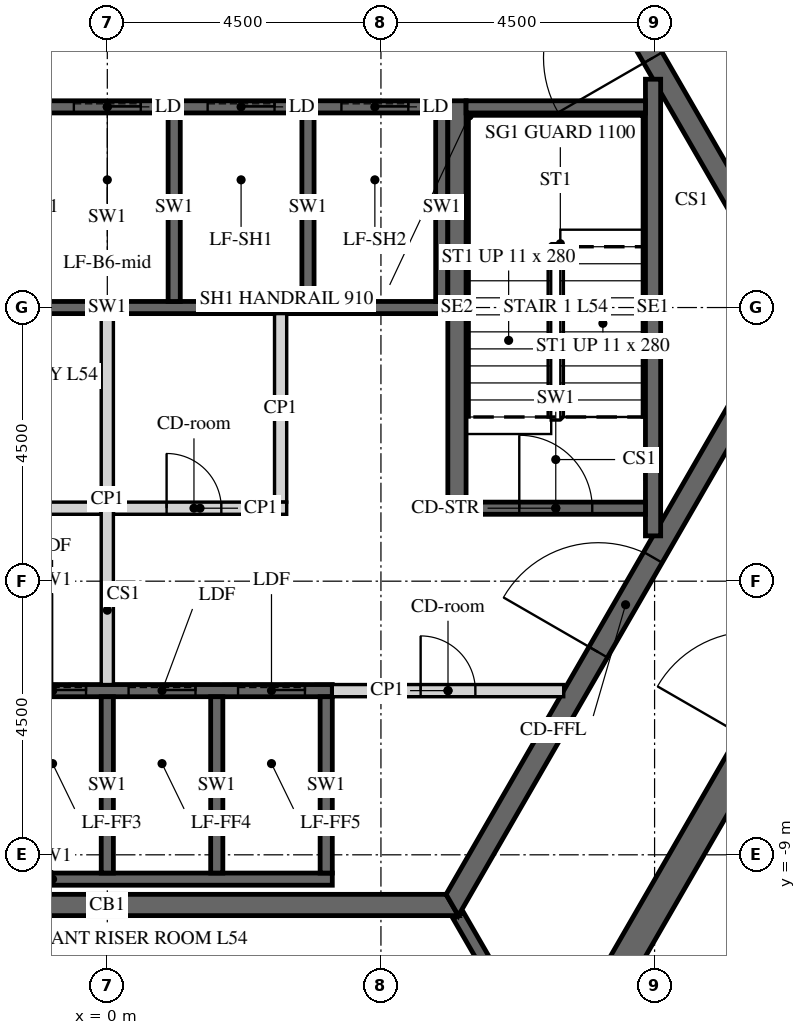
"""IFC4 building model, lengths in metres.
Left out: names, types, materials, properties, quantities, classifications, styles, units other than length and angle.
Written with IfcOpenShell. Run it as: python <this file> out.ifc"""

import sys

from ifc_helpers import new_model, si_unit, direction, frame, frame_2d, origin, place, context, subcontext, project, spatial, polyline, rectangle, outline, extrude, element, fill, save


model = new_model("IFC4")
c1 = context("Model", 3, precision=1e-05, world=origin(), true_north=direction((0.0, 1.0)))
c2 = subcontext(c1, "Body", "Model", "MODEL_VIEW")
j1 = project(units=[si_unit("LENGTHUNIT", "METRE"), si_unit("PLANEANGLEUNIT", "RADIAN")], contexts=[c1])
p1 = place(None, origin())
s1 = spatial("IfcSite", under=j1, at=p1, CompositionType="ELEMENT")
p2 = place(p1, origin())
s2 = spatial("IfcBuilding", under=s1, at=p2, CompositionType="ELEMENT")
p3 = place(p2, frame((0.0, 0.0, 226.8)))
s3 = spatial("IfcBuildingStorey", under=s2, at=p3, CompositionType="ELEMENT", Elevation=226.8)
p4 = place(p3, frame((7.361, -12.75, -0.15), z_axis=(0.0, 0.0, 1.0), x_axis=(0.50000571537, 0.866022103989, 0.0)))
e1 = element("IfcWall", 1, at=p4, inside=s3, PredefinedType="SHEAR", context=c2, shape_type="SweptSolid", body=[
    extrude(outline(polyline([(-0.144, -0.25), (14.867, -0.25), (14.578, 0.25), (0.144, 0.25), (-0.144, -0.25)])), origin(), (0.0, 0.0, 1.0), 3.9),
])
p5 = place(p4, frame((6.49, 0.0, 0.15)))
e2 = element("IfcOpeningElement", 2, at=p5, cuts=e1, PredefinedType="OPENING", context=c2, shape_type="SweptSolid", body=[
    extrude(rectangle(XDim=1.8, YDim=2.4, at=frame_2d((0.9, 1.2))), frame((0.0, 0.26, 0.0), z_axis=(0.0, -1.0, 0.0), x_axis=(1.0, 0.0, 0.0)), (0.0, 0.0, 1.0), 0.52),
])
p6 = place(p3, frame((14.722, 0.0, -0.15), z_axis=(0.0, 0.0, 1.0), x_axis=(-0.50000571537, 0.866022103989, 0.0)))
e3 = element("IfcWall", 3, at=p6, inside=s3, PredefinedType="SHEAR", context=c2, shape_type="SweptSolid", body=[
    extrude(outline(polyline([(-0.144, -0.25), (14.867, -0.25), (14.578, 0.25), (0.144, 0.25), (-0.144, -0.25)])), origin(), (0.0, 0.0, 1.0), 3.9),
])
p7 = place(p6, frame((6.432, 0.0, 0.15)))
e4 = element("IfcOpeningElement", 4, at=p7, cuts=e3, PredefinedType="OPENING", context=c2, shape_type="SweptSolid", body=[
    extrude(rectangle(XDim=1.8, YDim=2.4, at=frame_2d((0.9, 1.2))), frame((0.0, 0.26, 0.0), z_axis=(0.0, -1.0, 0.0), x_axis=(1.0, 0.0, 0.0)), (0.0, 0.0, 1.0), 0.52),
])
p8 = place(p3, frame((-5.673, -9.825, -0.15), z_axis=(0.0, 0.0, 1.0), x_axis=(1.0, 0.0, 0.0)))
e5 = element("IfcWall", 5, at=p8, inside=s3, PredefinedType="SHEAR", context=c2, shape_type="SweptSolid", body=[
    extrude(outline(polyline([(-0.101, -0.175), (11.446, -0.175), (11.244, 0.175), (0.101, 0.175), (-0.101, -0.175)])), origin(), (0.0, 0.0, 1.0), 3.9),
])
p9 = place(p3, frame((5.673, -9.825, -0.15), z_axis=(0.0, 0.0, 1.0), x_axis=(0.499995046907, 0.866028263435, 0.0)))
e6 = element("IfcWall", 6, at=p9, inside=s3, PredefinedType="SHEAR", context=c2, shape_type="SweptSolid", body=[
    extrude(outline(polyline([(-0.101, -0.175), (11.446, -0.175), (11.244, 0.175), (0.101, 0.175), (-0.101, -0.175)])), origin(), (0.0, 0.0, 1.0), 3.9),
])
p10 = place(p9, frame((4.801, 0.0, 0.15)))
e7 = element("IfcOpeningElement", 7, at=p10, cuts=e6, PredefinedType="OPENING", context=c2, shape_type="SweptSolid", body=[
    extrude(rectangle(XDim=1.8, YDim=2.4, at=frame_2d((0.9, 1.2))), frame((0.0, 0.185, 0.0), z_axis=(0.0, -1.0, 0.0), x_axis=(1.0, 0.0, 0.0)), (0.0, 0.0, 1.0), 0.37),
])
p11 = place(p3, frame((11.345, 0.0, -0.15), z_axis=(0.0, 0.0, 1.0), x_axis=(-0.499995046907, 0.866028263435, 0.0)))
e8 = element("IfcWall", 8, at=p11, inside=s3, PredefinedType="SHEAR", context=c2, shape_type="SweptSolid", body=[
    extrude(outline(polyline([(-0.101, -0.175), (11.446, -0.175), (11.244, 0.175), (0.101, 0.175), (-0.101, -0.175)])), origin(), (0.0, 0.0, 1.0), 3.9),
])
p12 = place(p11, frame((4.744, 0.0, 0.15)))
e9 = element("IfcOpeningElement", 9, at=p12, cuts=e8, PredefinedType="OPENING", context=c2, shape_type="SweptSolid", body=[
    extrude(rectangle(XDim=1.8, YDim=2.4, at=frame_2d((0.9, 1.2))), frame((0.0, 0.185, 0.0), z_axis=(0.0, -1.0, 0.0), x_axis=(1.0, 0.0, 0.0)), (0.0, 0.0, 1.0), 0.37),
])
p13 = place(p3, frame((-5.6, 3.3, -0.25), z_axis=(0.0, 0.0, 1.0), x_axis=(1.0, 0.0, 0.0)))
e10 = element("IfcWall", 10, at=p13, inside=s3, PredefinedType="SHEAR", context=c2, shape_type="SweptSolid", body=[
    extrude(rectangle(XDim=11.2, YDim=0.2, at=frame_2d((5.6, 0.0))), origin(), (0.0, 0.0, 1.0), 3.9),
])
p14 = place(p13, frame((0.65, 0.0, 0.25)))
e11 = element("IfcOpeningElement", 11, at=p14, cuts=e10, PredefinedType="OPENING", context=c2, shape_type="SweptSolid", body=[
    extrude(rectangle(XDim=1.1, YDim=2.1, at=frame_2d((0.55, 1.05))), frame((0.0, 0.11, 0.0), z_axis=(0.0, -1.0, 0.0), x_axis=(1.0, 0.0, 0.0)), (0.0, 0.0, 1.0), 0.22),
])
p15 = place(p13, frame((2.85, 0.0, 0.25)))
e12 = element("IfcOpeningElement", 12, at=p15, cuts=e10, PredefinedType="OPENING", context=c2, shape_type="SweptSolid", body=[
    extrude(rectangle(XDim=1.1, YDim=2.1, at=frame_2d((0.55, 1.05))), frame((0.0, 0.11, 0.0), z_axis=(0.0, -1.0, 0.0), x_axis=(1.0, 0.0, 0.0)), (0.0, 0.0, 1.0), 0.22),
])
p16 = place(p13, frame((5.05, 0.0, 0.25)))
e13 = element("IfcOpeningElement", 13, at=p16, cuts=e10, PredefinedType="OPENING", context=c2, shape_type="SweptSolid", body=[
    extrude(rectangle(XDim=1.1, YDim=2.1, at=frame_2d((0.55, 1.05))), frame((0.0, 0.11, 0.0), z_axis=(0.0, -1.0, 0.0), x_axis=(1.0, 0.0, 0.0)), (0.0, 0.0, 1.0), 0.22),
])
p17 = place(p13, frame((7.25, 0.0, 0.25)))
e14 = element("IfcOpeningElement", 14, at=p17, cuts=e10, PredefinedType="OPENING", context=c2, shape_type="SweptSolid", body=[
    extrude(rectangle(XDim=1.1, YDim=2.1, at=frame_2d((0.55, 1.05))), frame((0.0, 0.11, 0.0), z_axis=(0.0, -1.0, 0.0), x_axis=(1.0, 0.0, 0.0)), (0.0, 0.0, 1.0), 0.22),
])
p18 = place(p13, frame((9.45, 0.0, 0.25)))
e15 = element("IfcOpeningElement", 15, at=p18, cuts=e10, PredefinedType="OPENING", context=c2, shape_type="SweptSolid", body=[
    extrude(rectangle(XDim=1.1, YDim=2.1, at=frame_2d((0.55, 1.05))), frame((0.0, 0.11, 0.0), z_axis=(0.0, -1.0, 0.0), x_axis=(1.0, 0.0, 0.0)), (0.0, 0.0, 1.0), 0.22),
])
p19 = place(p3, frame((-5.6, 0.0, -0.25), z_axis=(0.0, 0.0, 1.0), x_axis=(1.0, 0.0, 0.0)))
e16 = element("IfcWall", 16, at=p19, inside=s3, PredefinedType="SHEAR", context=c2, shape_type="SweptSolid", body=[
    extrude(rectangle(XDim=11.2, YDim=0.2, at=frame_2d((5.6, 0.0))), origin(), (0.0, 0.0, 1.0), 3.9),
])
for number, where, z_axis, x_axis in (
    (17, (1.1, 0.1, -0.25), (0.0, 0.0, 1.0), (0.0, 1.0, 0.0)),
    (18, (3.3, 0.1, -0.25), (0.0, 0.0, 1.0), (0.0, 1.0, 0.0)),
    (19, (5.5, 0.1, -0.25), (0.0, 0.0, 1.0), (0.0, 1.0, 0.0)),
):
    element("IfcWall", number, at=place(p3, frame(where, z_axis=z_axis, x_axis=x_axis)), inside=s3, PredefinedType="SHEAR", context=c2, shape_type="SweptSolid", body=[
        extrude(rectangle(XDim=3.1, YDim=0.2, at=frame_2d((1.55, 0.0))), origin(), (0.0, 0.0, 1.0), 3.9),
    ])
p20 = place(p3, frame((-5.5, -6.3, -0.25), z_axis=(0.0, 0.0, 1.0), x_axis=(1.0, 0.0, 0.0)))
e20 = element("IfcWall", 20, at=p20, inside=s3, PredefinedType="SHEAR", context=c2, shape_type="SweptSolid", body=[
    extrude(rectangle(XDim=9.2, YDim=0.2, at=frame_2d((4.6, 0.0))), origin(), (0.0, 0.0, 1.0), 3.9),
])
p21 = place(p20, frame((0.45, 0.0, 0.25)))
e21 = element("IfcOpeningElement", 21, at=p21, cuts=e20, PredefinedType="OPENING", context=c2, shape_type="SweptSolid", body=[
    extrude(rectangle(XDim=1.1, YDim=2.1, at=frame_2d((0.55, 1.05))), frame((0.0, 0.11, 0.0), z_axis=(0.0, -1.0, 0.0), x_axis=(1.0, 0.0, 0.0)), (0.0, 0.0, 1.0), 0.22),
])
p22 = place(p20, frame((2.25, 0.0, 0.25)))
e22 = element("IfcOpeningElement", 22, at=p22, cuts=e20, PredefinedType="OPENING", context=c2, shape_type="SweptSolid", body=[
    extrude(rectangle(XDim=1.1, YDim=2.1, at=frame_2d((0.55, 1.05))), frame((0.0, 0.11, 0.0), z_axis=(0.0, -1.0, 0.0), x_axis=(1.0, 0.0, 0.0)), (0.0, 0.0, 1.0), 0.22),
])
p23 = place(p20, frame((4.05, 0.0, 0.25)))
e23 = element("IfcOpeningElement", 23, at=p23, cuts=e20, PredefinedType="OPENING", context=c2, shape_type="SweptSolid", body=[
    extrude(rectangle(XDim=1.1, YDim=2.1, at=frame_2d((0.55, 1.05))), frame((0.0, 0.11, 0.0), z_axis=(0.0, -1.0, 0.0), x_axis=(1.0, 0.0, 0.0)), (0.0, 0.0, 1.0), 0.22),
])
p24 = place(p20, frame((5.85, 0.0, 0.25)))
e24 = element("IfcOpeningElement", 24, at=p24, cuts=e20, PredefinedType="OPENING", context=c2, shape_type="SweptSolid", body=[
    extrude(rectangle(XDim=1.1, YDim=2.1, at=frame_2d((0.55, 1.05))), frame((0.0, 0.11, 0.0), z_axis=(0.0, -1.0, 0.0), x_axis=(1.0, 0.0, 0.0)), (0.0, 0.0, 1.0), 0.22),
])
p25 = place(p20, frame((7.65, 0.0, 0.25)))
e25 = element("IfcOpeningElement", 25, at=p25, cuts=e20, PredefinedType="OPENING", context=c2, shape_type="SweptSolid", body=[
    extrude(rectangle(XDim=1.1, YDim=2.1, at=frame_2d((0.55, 1.05))), frame((0.0, 0.11, 0.0), z_axis=(0.0, -1.0, 0.0), x_axis=(1.0, 0.0, 0.0)), (0.0, 0.0, 1.0), 0.22),
])
p26 = place(p3, frame((-5.5, -9.4, -0.25), z_axis=(0.0, 0.0, 1.0), x_axis=(1.0, 0.0, 0.0)))
e26 = element("IfcWall", 26, at=p26, inside=s3, PredefinedType="SHEAR", context=c2, shape_type="SweptSolid", body=[
    extrude(rectangle(XDim=9.2, YDim=0.2, at=frame_2d((4.6, 0.0))), origin(), (0.0, 0.0, 1.0), 3.9),
])
for number, where, z_axis, x_axis in (
    (27, (0.0, -9.3, -0.25), (0.0, 0.0, 1.0), (0.0, 1.0, 0.0)),
    (28, (1.8, -9.3, -0.25), (0.0, 0.0, 1.0), (0.0, 1.0, 0.0)),
    (29, (3.6, -9.3, -0.25), (0.0, 0.0, 1.0), (0.0, 1.0, 0.0)),
):
    element("IfcWall", number, at=place(p3, frame(where, z_axis=z_axis, x_axis=x_axis)), inside=s3, PredefinedType="SHEAR", context=c2, shape_type="SweptSolid", body=[
        extrude(rectangle(XDim=2.9, YDim=0.2, at=frame_2d((1.45, 0.0))), origin(), (0.0, 0.0, 1.0), 3.9),
    ])
p27 = place(p3, frame((-5.6, -3.3, 0.0), z_axis=(0.0, 0.0, 1.0), x_axis=(1.0, 0.0, 0.0)))
e30 = element("IfcWall", 30, at=p27, inside=s3, PredefinedType="PARTITIONING", context=c2, shape_type="SweptSolid", body=[
    extrude(rectangle(XDim=5.5, YDim=0.2, at=frame_2d((2.75, 0.0))), origin(), (0.0, 0.0, 1.0), 3.65),
])
p28 = place(p27, frame((2.3, 0.0, 0.0)))
e31 = element("IfcOpeningElement", 31, at=p28, cuts=e30, PredefinedType="OPENING", context=c2, shape_type="SweptSolid", body=[
    extrude(rectangle(XDim=0.9, YDim=2.1, at=frame_2d((0.45, 1.05))), frame((0.0, 0.11, 0.0), z_axis=(0.0, -1.0, 0.0), x_axis=(1.0, 0.0, 0.0)), (0.0, 0.0, 1.0), 0.22),
])
p29 = place(p3, frame((0.1, -3.3, 0.0), z_axis=(0.0, 0.0, 1.0), x_axis=(1.0, 0.0, 0.0)))
e32 = element("IfcWall", 32, at=p29, inside=s3, PredefinedType="PARTITIONING", context=c2, shape_type="SweptSolid", body=[
    extrude(rectangle(XDim=2.85, YDim=0.2, at=frame_2d((1.425, 0.0))), origin(), (0.0, 0.0, 1.0), 3.65),
])
p30 = place(p29, frame((0.875, 0.0, 0.0)))
e33 = element("IfcOpeningElement", 33, at=p30, cuts=e32, PredefinedType="OPENING", context=c2, shape_type="SweptSolid", body=[
    extrude(rectangle(XDim=0.9, YDim=2.1, at=frame_2d((0.45, 1.05))), frame((0.0, 0.11, 0.0), z_axis=(0.0, -1.0, 0.0), x_axis=(1.0, 0.0, 0.0)), (0.0, 0.0, 1.0), 0.22),
])
p31 = place(p3, frame((2.85, -3.2, 0.0), z_axis=(0.0, 0.0, 1.0), x_axis=(0.0, 1.0, 0.0)))
e34 = element("IfcWall", 34, at=p31, inside=s3, PredefinedType="PARTITIONING", context=c2, shape_type="SweptSolid", body=[
    extrude(rectangle(XDim=3.1, YDim=0.2, at=frame_2d((1.55, 0.0))), origin(), (0.0, 0.0, 1.0), 3.65),
])
p32 = place(p3, frame((0.0, -6.2, 0.0), z_axis=(0.0, 0.0, 1.0), x_axis=(0.0, 1.0, 0.0)))
e35 = element("IfcWall", 35, at=p32, inside=s3, PredefinedType="PARTITIONING", context=c2, shape_type="SweptSolid", body=[
    extrude(rectangle(XDim=6.1, YDim=0.2, at=frame_2d((3.05, 0.0))), origin(), (0.0, 0.0, 1.0), 3.65),
])
p33 = place(p3, frame((3.7, -6.3, 0.0), z_axis=(0.0, 0.0, 1.0), x_axis=(1.0, 0.0, 0.0)))
e36 = element("IfcWall", 36, at=p33, inside=s3, PredefinedType="PARTITIONING", context=c2, shape_type="SweptSolid", body=[
    extrude(rectangle(XDim=3.806, YDim=0.2, at=frame_2d((1.903, 0.0))), origin(), (0.0, 0.0, 1.0), 3.65),
])
p34 = place(p33, frame((1.453, 0.0, 0.0)))
e37 = element("IfcOpeningElement", 37, at=p34, cuts=e36, PredefinedType="OPENING", context=c2, shape_type="SweptSolid", body=[
    extrude(rectangle(XDim=0.9, YDim=2.1, at=frame_2d((0.45, 1.05))), frame((0.0, 0.11, 0.0), z_axis=(0.0, -1.0, 0.0), x_axis=(1.0, 0.0, 0.0)), (0.0, 0.0, 1.0), 0.22),
])
p35 = place(p3, frame((5.773, -10.0, -0.15), z_axis=(0.0, 0.0, 1.0), x_axis=(0.499995765644, -0.866027848477, 0.0)))
e38 = element("IfcWall", 38, at=p35, inside=s3, PredefinedType="SHEAR", context=c2, shape_type="SweptSolid", body=[
    extrude(rectangle(XDim=2.887, YDim=0.2, at=frame_2d((1.443, 0.0))), origin(), (0.0, 0.0, 1.0), 3.9),
])
p36 = place(p3, frame((5.75, -3.4, -0.25), z_axis=(0.0, 0.0, 1.0), x_axis=(0.0, 1.0, 0.0)))
e39 = element("IfcWall", 39, at=p36, inside=s3, PredefinedType="SHEAR", context=c2, shape_type="SweptSolid", body=[
    extrude(rectangle(XDim=6.8, YDim=0.3, at=frame_2d((3.4, 0.0))), origin(), (0.0, 0.0, 1.0), 3.9),
])
p37 = place(p3, frame((8.975, -3.755, -0.25), z_axis=(0.0, 0.0, 1.0), x_axis=(0.0, 1.0, 0.0)))
e40 = element("IfcWall", 40, at=p37, inside=s3, PredefinedType="SHEAR", context=c2, shape_type="SweptSolid", body=[
    extrude(rectangle(XDim=7.51, YDim=0.25, at=frame_2d((3.755, 0.0))), origin(), (0.0, 0.0, 1.0), 3.9),
])
p38 = place(p3, frame((5.9, 3.3, -0.25), z_axis=(0.0, 0.0, 1.0), x_axis=(1.0, 0.0, 0.0)))
e41 = element("IfcWall", 41, at=p38, inside=s3, PredefinedType="SHEAR", context=c2, shape_type="SweptSolid", body=[
    extrude(rectangle(XDim=2.95, YDim=0.2, at=frame_2d((1.475, 0.0))), origin(), (0.0, 0.0, 1.0), 3.9),
])
p39 = place(p3, frame((5.9, -3.3, -0.25), z_axis=(0.0, 0.0, 1.0), x_axis=(1.0, 0.0, 0.0)))
e42 = element("IfcWall", 42, at=p39, inside=s3, PredefinedType="SHEAR", context=c2, shape_type="SweptSolid", body=[
    extrude(rectangle(XDim=2.95, YDim=0.2, at=frame_2d((1.475, 0.0))), origin(), (0.0, 0.0, 1.0), 3.9),
])
p40 = place(p39, frame((0.875, 0.0, 0.25)))
e43 = element("IfcOpeningElement", 43, at=p40, cuts=e42, PredefinedType="OPENING", context=c2, shape_type="SweptSolid", body=[
    extrude(rectangle(XDim=1.2, YDim=2.4, at=frame_2d((0.6, 1.2))), frame((0.0, 0.11, 0.0), z_axis=(0.0, -1.0, 0.0), x_axis=(1.0, 0.0, 0.0)), (0.0, 0.0, 1.0), 0.22),
])
p41 = place(p3, frame((9.772, -12.675, 0.0), z_axis=(0.0, 0.0, 1.0), x_axis=(0.499996322767, 0.866027526826, 0.0)))
e44 = element("IfcWall", 44, at=p41, inside=s3, PredefinedType="PARTITIONING", context=c2, shape_type="SweptSolid", body=[
    extrude(rectangle(XDim=14.636, YDim=0.15, at=frame_2d((7.318, 0.0))), origin(), (0.0, 0.0, 1.0), 2.988),
])
p42 = place(p41, frame((5.309, 0.0, 0.0)))
e45 = element("IfcOpeningElement", 45, at=p42, cuts=e44, PredefinedType="OPENING", context=c2, shape_type="SweptSolid", body=[
    extrude(rectangle(XDim=1.0, YDim=2.1, at=frame_2d((0.5, 1.05))), frame((0.0, 0.085, 0.0), z_axis=(0.0, -1.0, 0.0), x_axis=(1.0, 0.0, 0.0)), (0.0, 0.0, 1.0), 0.17),
])
p43 = place(p41, frame((13.486, 0.0, 0.0)))
e46 = element("IfcOpeningElement", 46, at=p43, cuts=e44, PredefinedType="OPENING", context=c2, shape_type="SweptSolid", body=[
    extrude(rectangle(XDim=1.0, YDim=2.1, at=frame_2d((0.5, 1.05))), frame((0.0, 0.085, 0.0), z_axis=(0.0, -1.0, 0.0), x_axis=(1.0, 0.0, 0.0)), (0.0, 0.0, 1.0), 0.17),
])
p44 = place(p3, frame((17.046, 0.075, 0.0), z_axis=(0.0, 0.0, 1.0), x_axis=(-0.499996322767, 0.866027526826, 0.0)))
e47 = element("IfcWall", 47, at=p44, inside=s3, PredefinedType="PARTITIONING", context=c2, shape_type="SweptSolid", body=[
    extrude(rectangle(XDim=14.636, YDim=0.15, at=frame_2d((7.318, 0.0))), origin(), (0.0, 0.0, 1.0), 2.988),
])
p45 = place(p44, frame((1.781, 0.0, 0.0)))
e48 = element("IfcOpeningElement", 48, at=p45, cuts=e47, PredefinedType="OPENING", context=c2, shape_type="SweptSolid", body=[
    extrude(rectangle(XDim=1.0, YDim=2.1, at=frame_2d((0.5, 1.05))), frame((0.0, 0.085, 0.0), z_axis=(0.0, -1.0, 0.0), x_axis=(1.0, 0.0, 0.0)), (0.0, 0.0, 1.0), 0.17),
])
p46 = place(p44, frame((7.872, 0.0, 0.0)))
e49 = element("IfcOpeningElement", 49, at=p46, cuts=e47, PredefinedType="OPENING", context=c2, shape_type="SweptSolid", body=[
    extrude(rectangle(XDim=1.0, YDim=2.1, at=frame_2d((0.5, 1.05))), frame((0.0, 0.085, 0.0), z_axis=(0.0, -1.0, 0.0), x_axis=(1.0, 0.0, 0.0)), (0.0, 0.0, 1.0), 0.17),
])
p47 = place(p44, frame((13.203, 0.0, 0.0)))
e50 = element("IfcOpeningElement", 50, at=p47, cuts=e47, PredefinedType="OPENING", context=c2, shape_type="SweptSolid", body=[
    extrude(rectangle(XDim=1.0, YDim=2.1, at=frame_2d((0.5, 1.05))), frame((0.0, 0.085, 0.0), z_axis=(0.0, -1.0, 0.0), x_axis=(1.0, 0.0, 0.0)), (0.0, 0.0, 1.0), 0.17),
])
p48 = place(p12, origin())
e51 = element("IfcDoor", 51, at=p48, inside=s3, OperationType="DOUBLE_DOOR_SINGLE_SWING", PredefinedType="DOOR", context=c2, shape_type="SweptSolid", body=[
    extrude(rectangle(XDim=1.8, YDim=2.4, at=frame_2d((0.9, 1.2))), frame((0.0, 0.025, 0.0), z_axis=(0.0, -1.0, 0.0), x_axis=(1.0, 0.0, 0.0)), (0.0, 0.0, 1.0), 0.05),
])
fill(e9, e51)
p49 = place(p10, origin())
e52 = element("IfcDoor", 52, at=p49, inside=s3, OperationType="DOUBLE_DOOR_SINGLE_SWING", PredefinedType="DOOR", context=c2, shape_type="SweptSolid", body=[
    extrude(rectangle(XDim=1.8, YDim=2.4, at=frame_2d((0.9, 1.2))), frame((0.0, 0.025, 0.0), z_axis=(0.0, -1.0, 0.0), x_axis=(1.0, 0.0, 0.0)), (0.0, 0.0, 1.0), 0.05),
])
fill(e7, e52)
p50 = place(p30, origin())
e53 = element("IfcDoor", 53, at=p50, inside=s3, OperationType="SINGLE_SWING_LEFT", PredefinedType="DOOR", context=c2, shape_type="SweptSolid", body=[
    extrude(rectangle(XDim=0.9, YDim=2.1, at=frame_2d((0.45, 1.05))), frame((0.0, 0.025, 0.0), z_axis=(0.0, -1.0, 0.0), x_axis=(1.0, 0.0, 0.0)), (0.0, 0.0, 1.0), 0.05),
])
fill(e33, e53)
p51 = place(p34, origin())
e54 = element("IfcDoor", 54, at=p51, inside=s3, OperationType="SINGLE_SWING_LEFT", PredefinedType="DOOR", context=c2, shape_type="SweptSolid", body=[
    extrude(rectangle(XDim=0.9, YDim=2.1, at=frame_2d((0.45, 1.05))), frame((0.0, 0.025, 0.0), z_axis=(0.0, -1.0, 0.0), x_axis=(1.0, 0.0, 0.0)), (0.0, 0.0, 1.0), 0.05),
])
fill(e37, e54)
p52 = place(p40, origin())
e55 = element("IfcDoor", 55, at=p52, inside=s3, OperationType="SINGLE_SWING_LEFT", PredefinedType="DOOR", context=c2, shape_type="SweptSolid", body=[
    extrude(rectangle(XDim=1.2, YDim=2.4, at=frame_2d((0.6, 1.2))), frame((0.0, 0.025, 0.0), z_axis=(0.0, -1.0, 0.0), x_axis=(1.0, 0.0, 0.0)), (0.0, 0.0, 1.0), 0.05),
])
fill(e43, e55)
p53 = place(p16, origin())
e56 = element("IfcDoor", 56, at=p53, inside=s3, OperationType="SLIDING_TO_LEFT", PredefinedType="DOOR", context=c2, shape_type="SweptSolid", body=[
    extrude(rectangle(XDim=1.1, YDim=2.1, at=frame_2d((0.55, 1.05))), frame((0.0, 0.025, 0.0), z_axis=(0.0, -1.0, 0.0), x_axis=(1.0, 0.0, 0.0)), (0.0, 0.0, 1.0), 0.05),
])
fill(e13, e56)
p54 = place(p17, origin())
e57 = element("IfcDoor", 57, at=p54, inside=s3, OperationType="SLIDING_TO_LEFT", PredefinedType="DOOR", context=c2, shape_type="SweptSolid", body=[
    extrude(rectangle(XDim=1.1, YDim=2.1, at=frame_2d((0.55, 1.05))), frame((0.0, 0.025, 0.0), z_axis=(0.0, -1.0, 0.0), x_axis=(1.0, 0.0, 0.0)), (0.0, 0.0, 1.0), 0.05),
])
fill(e14, e57)
p55 = place(p18, origin())
e58 = element("IfcDoor", 58, at=p55, inside=s3, OperationType="SLIDING_TO_LEFT", PredefinedType="DOOR", context=c2, shape_type="SweptSolid", body=[
    extrude(rectangle(XDim=1.1, YDim=2.1, at=frame_2d((0.55, 1.05))), frame((0.0, 0.025, 0.0), z_axis=(0.0, -1.0, 0.0), x_axis=(1.0, 0.0, 0.0)), (0.0, 0.0, 1.0), 0.05),
])
fill(e15, e58)
p56 = place(p23, origin())
e59 = element("IfcDoor", 59, at=p56, inside=s3, OperationType="SLIDING_TO_LEFT", PredefinedType="DOOR", context=c2, shape_type="SweptSolid", body=[
    extrude(rectangle(XDim=1.1, YDim=2.1, at=frame_2d((0.55, 1.05))), frame((0.0, 0.025, 0.0), z_axis=(0.0, -1.0, 0.0), x_axis=(1.0, 0.0, 0.0)), (0.0, 0.0, 1.0), 0.05),
])
fill(e23, e59)
p57 = place(p24, origin())
e60 = element("IfcDoor", 60, at=p57, inside=s3, OperationType="SLIDING_TO_LEFT", PredefinedType="DOOR", context=c2, shape_type="SweptSolid", body=[
    extrude(rectangle(XDim=1.1, YDim=2.1, at=frame_2d((0.55, 1.05))), frame((0.0, 0.025, 0.0), z_axis=(0.0, -1.0, 0.0), x_axis=(1.0, 0.0, 0.0)), (0.0, 0.0, 1.0), 0.05),
])
fill(e24, e60)
p58 = place(p25, origin())
e61 = element("IfcDoor", 61, at=p58, inside=s3, OperationType="SLIDING_TO_LEFT", PredefinedType="DOOR", context=c2, shape_type="SweptSolid", body=[
    extrude(rectangle(XDim=1.1, YDim=2.1, at=frame_2d((0.55, 1.05))), frame((0.0, 0.025, 0.0), z_axis=(0.0, -1.0, 0.0), x_axis=(1.0, 0.0, 0.0)), (0.0, 0.0, 1.0), 0.05),
])
fill(e25, e61)
save(model, sys.argv[1])
